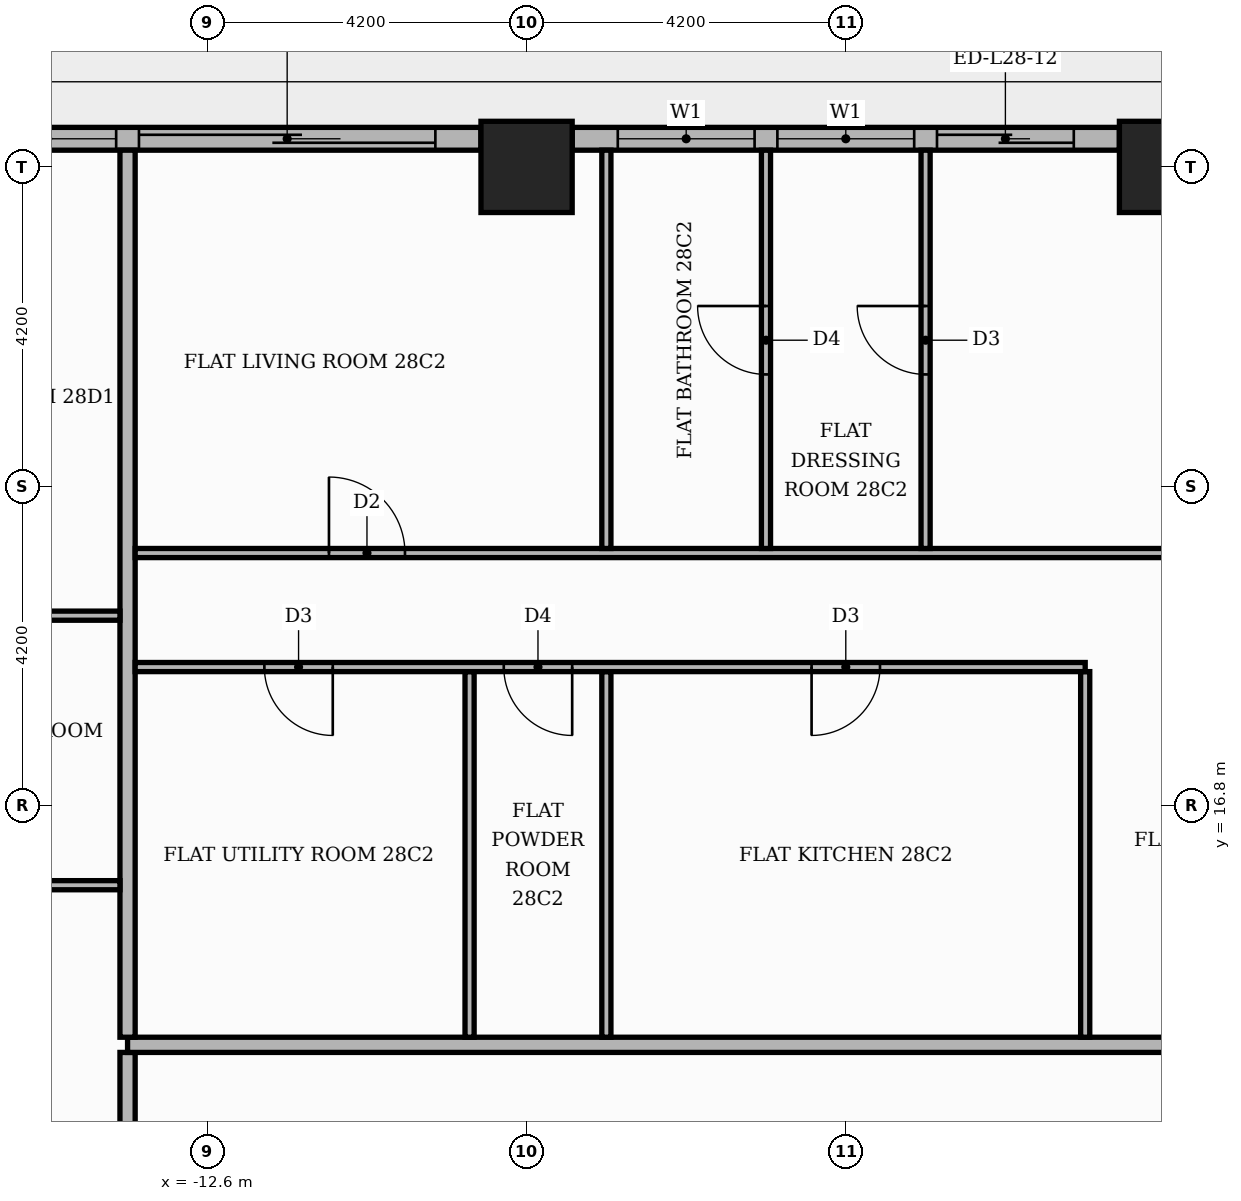
"""IFC4 building model, lengths in metres.
Left out: names, types, materials, properties, quantities, classifications, styles, units other than length and angle.
Written with IfcOpenShell. Run it as: python <this file> out.ifc"""

import sys

from ifc_helpers import new_model, si_unit, direction, frame, frame_2d, origin, origin_2d, place, context, subcontext, project, spatial, rectangle, extrude, element, fill, save


model = new_model("IFC4")
c1 = context("Model", 3, precision=1e-05, world=origin(), true_north=direction((0.0, 1.0)))
c2 = subcontext(c1, "Body", "Model", "MODEL_VIEW")
j1 = project(units=[si_unit("LENGTHUNIT", "METRE"), si_unit("PLANEANGLEUNIT", "RADIAN")], contexts=[c1])
p1 = place(None, origin())
s1 = spatial("IfcSite", under=j1, at=p1, CompositionType="ELEMENT")
p2 = place(p1, origin())
s2 = spatial("IfcBuilding", under=s1, at=p2, CompositionType="ELEMENT")
p3 = place(p2, frame((0.0, 0.0, 118.2)))
s3 = spatial("IfcBuildingStorey", under=s2, at=p3, CompositionType="ELEMENT", Elevation=118.2)
for number, where, z_axis, x_axis in (
    (1, (0.0, 25.2, 0.0), (0.0, 0.0, 1.0), (1.0, 0.0, 0.0)),
    (2, (-8.4, 25.2, 0.0), (0.0, 0.0, 1.0), (1.0, 0.0, 0.0)),
):
    element("IfcColumn", number, at=place(p3, frame(where, z_axis=z_axis, x_axis=x_axis)), inside=s3, PredefinedType="COLUMN", context=c2, shape_type="SweptSolid", body=[
        extrude(rectangle(XDim=1.2, YDim=1.2, at=origin_2d()), origin(), (0.0, 0.0, 1.0), 3.9),
    ])
p4 = place(p3, frame((-0.6, 25.57, 0.0), z_axis=(0.0, 0.0, 1.0), x_axis=(-1.0, 0.0, 0.0)))
e3 = element("IfcWall", 3, at=p4, inside=s3, PredefinedType="STANDARD", context=c2, shape_type="SweptSolid", body=[
    extrude(rectangle(XDim=7.2, YDim=0.3, at=frame_2d((3.6, 0.0))), origin(), (0.0, 0.0, 1.0), 3.48),
])
p5 = place(p4, frame((0.6, 0.0, 0.0)))
e4 = element("IfcOpeningElement", 4, at=p5, cuts=e3, PredefinedType="OPENING", context=c2, shape_type="SweptSolid", body=[
    extrude(rectangle(XDim=1.8, YDim=2.4, at=frame_2d((0.9, 1.2))), frame((0.0, 0.16, 0.0), z_axis=(0.0, -1.0, 0.0), x_axis=(1.0, 0.0, 0.0)), (0.0, 0.0, 1.0), 0.32),
])
p6 = place(p4, frame((2.7, 0.0, 0.9)))
e5 = element("IfcOpeningElement", 5, at=p6, cuts=e3, PredefinedType="OPENING", context=c2, shape_type="SweptSolid", body=[
    extrude(rectangle(XDim=1.8, YDim=2.1, at=frame_2d((0.9, 1.05))), frame((0.0, 0.16, 0.0), z_axis=(0.0, -1.0, 0.0), x_axis=(1.0, 0.0, 0.0)), (0.0, 0.0, 1.0), 0.32),
])
p7 = place(p4, frame((4.8, 0.0, 0.9)))
e6 = element("IfcOpeningElement", 6, at=p7, cuts=e3, PredefinedType="OPENING", context=c2, shape_type="SweptSolid", body=[
    extrude(rectangle(XDim=1.8, YDim=2.1, at=frame_2d((0.9, 1.05))), frame((0.0, 0.16, 0.0), z_axis=(0.0, -1.0, 0.0), x_axis=(1.0, 0.0, 0.0)), (0.0, 0.0, 1.0), 0.32),
])
p8 = place(p3, frame((-9.0, 25.57, 0.0), z_axis=(0.0, 0.0, 1.0), x_axis=(-1.0, 0.0, 0.0)))
e7 = element("IfcWall", 7, at=p8, inside=s3, PredefinedType="STANDARD", context=c2, shape_type="SweptSolid", body=[
    extrude(rectangle(XDim=7.2, YDim=0.3, at=frame_2d((3.6, 0.0))), origin(), (0.0, 0.0, 1.0), 3.48),
])
p9 = place(p8, frame((0.6, 0.0, 0.0)))
e8 = element("IfcOpeningElement", 8, at=p9, cuts=e7, PredefinedType="OPENING", context=c2, shape_type="SweptSolid", body=[
    extrude(rectangle(XDim=3.9, YDim=2.4, at=frame_2d((1.95, 1.2))), frame((0.0, 0.16, 0.0), z_axis=(0.0, -1.0, 0.0), x_axis=(1.0, 0.0, 0.0)), (0.0, 0.0, 1.0), 0.32),
])
p10 = place(p8, frame((4.8, 0.0, 0.9)))
e9 = element("IfcOpeningElement", 9, at=p10, cuts=e7, PredefinedType="OPENING", context=c2, shape_type="SweptSolid", body=[
    extrude(rectangle(XDim=1.8, YDim=2.1, at=frame_2d((0.9, 1.05))), frame((0.0, 0.16, 0.0), z_axis=(0.0, -1.0, 0.0), x_axis=(1.0, 0.0, 0.0)), (0.0, 0.0, 1.0), 0.32),
])
p11 = place(p3, frame((-13.65, 5.35, 0.0), z_axis=(0.0, 0.0, 1.0), x_axis=(0.0, 1.0, 0.0)))
e10 = element("IfcWall", 10, at=p11, inside=s3, PredefinedType="PARTITIONING", context=c2, shape_type="SweptSolid", body=[
    extrude(rectangle(XDim=8.2, YDim=0.2, at=frame_2d((4.1, 0.0))), origin(), (0.0, 0.0, 1.0), 3.48),
])
p12 = place(p11, frame((5.65, 0.0, 0.0)))
e11 = element("IfcOpeningElement", 11, at=p12, cuts=e10, PredefinedType="OPENING", context=c2, shape_type="SweptSolid", body=[
    extrude(rectangle(XDim=1.1, YDim=2.4, at=frame_2d((0.55, 1.2))), frame((0.0, 0.11, 0.0), z_axis=(0.0, -1.0, 0.0), x_axis=(1.0, 0.0, 0.0)), (0.0, 0.0, 1.0), 0.22),
])
p13 = place(p3, frame((-13.65, 13.65, 0.0), z_axis=(0.0, 0.0, 1.0), x_axis=(1.0, 0.0, 0.0)))
e12 = element("IfcWall", 12, at=p13, inside=s3, PredefinedType="PARTITIONING", context=c2, shape_type="SweptSolid", body=[
    extrude(rectangle(XDim=39.07, YDim=0.2, at=frame_2d((19.535, 0.0))), origin(), (0.0, 0.0, 1.0), 3.48),
])
p14 = place(p13, frame((24.65, 0.0, 0.0)))
e13 = element("IfcOpeningElement", 13, at=p14, cuts=e12, PredefinedType="OPENING", context=c2, shape_type="SweptSolid", body=[
    extrude(rectangle(XDim=1.1, YDim=2.4, at=frame_2d((0.55, 1.2))), frame((0.0, 0.11, 0.0), z_axis=(0.0, -1.0, 0.0), x_axis=(1.0, 0.0, 0.0)), (0.0, 0.0, 1.0), 0.22),
])
p15 = place(p13, frame((14.15, 0.0, 0.0)))
e14 = element("IfcOpeningElement", 14, at=p15, cuts=e12, PredefinedType="OPENING", context=c2, shape_type="SweptSolid", body=[
    extrude(rectangle(XDim=1.1, YDim=2.4, at=frame_2d((0.55, 1.2))), frame((0.0, 0.11, 0.0), z_axis=(0.0, -1.0, 0.0), x_axis=(1.0, 0.0, 0.0)), (0.0, 0.0, 1.0), 0.22),
])
p16 = place(p3, frame((-13.65, 13.75, 0.0), z_axis=(0.0, 0.0, 1.0), x_axis=(0.0, 1.0, 0.0)))
e15 = element("IfcWall", 15, at=p16, inside=s3, PredefinedType="PARTITIONING", context=c2, shape_type="SweptSolid", body=[
    extrude(rectangle(XDim=11.67, YDim=0.2, at=frame_2d((5.835, 0.0))), origin(), (0.0, 0.0, 1.0), 3.48),
])
for number, where, z_axis, x_axis in (
    (16, (-9.15, 13.75, 0.0), (0.0, 0.0, 1.0), (0.0, 1.0, 0.0)),
    (17, (-7.35, 13.75, 0.0), (0.0, 0.0, 1.0), (0.0, 1.0, 0.0)),
    (18, (-1.05, 13.75, 0.0), (0.0, 0.0, 1.0), (0.0, 1.0, 0.0)),
):
    element("IfcWall", number, at=place(p3, frame(where, z_axis=z_axis, x_axis=x_axis)), inside=s3, PredefinedType="PARTITIONING", context=c2, shape_type="SweptSolid", body=[
        extrude(rectangle(XDim=4.81, YDim=0.12, at=frame_2d((2.405, 0.0))), origin(), (0.0, 0.0, 1.0), 3.48),
    ])
p17 = place(p3, frame((-19.82, 15.75, 0.0), z_axis=(0.0, 0.0, 1.0), x_axis=(1.0, 0.0, 0.0)))
e19 = element("IfcWall", 19, at=p17, inside=s3, PredefinedType="PARTITIONING", context=c2, shape_type="SweptSolid", body=[
    extrude(rectangle(XDim=6.07, YDim=0.12, at=frame_2d((3.035, 0.0))), origin(), (0.0, 0.0, 1.0), 3.48),
])
p18 = place(p17, frame((2.585, 0.0, 0.0)))
e20 = element("IfcOpeningElement", 20, at=p18, cuts=e19, PredefinedType="OPENING", context=c2, shape_type="SweptSolid", body=[
    extrude(rectangle(XDim=1.0, YDim=2.1, at=frame_2d((0.5, 1.05))), frame((0.0, 0.07, 0.0), z_axis=(0.0, -1.0, 0.0), x_axis=(1.0, 0.0, 0.0)), (0.0, 0.0, 1.0), 0.14),
])
p19 = place(p3, frame((-13.55, 18.62, 0.0), z_axis=(0.0, 0.0, 1.0), x_axis=(1.0, 0.0, 0.0)))
e21 = element("IfcWall", 21, at=p19, inside=s3, PredefinedType="PARTITIONING", context=c2, shape_type="SweptSolid", body=[
    extrude(rectangle(XDim=12.5, YDim=0.12, at=frame_2d((6.25, 0.0))), origin(), (0.0, 0.0, 1.0), 3.48),
])
p20 = place(p19, frame((8.9, 0.0, 0.0)))
e22 = element("IfcOpeningElement", 22, at=p20, cuts=e21, PredefinedType="OPENING", context=c2, shape_type="SweptSolid", body=[
    extrude(rectangle(XDim=0.9, YDim=2.1, at=frame_2d((0.45, 1.05))), frame((0.0, 0.07, 0.0), z_axis=(0.0, -1.0, 0.0), x_axis=(1.0, 0.0, 0.0)), (0.0, 0.0, 1.0), 0.14),
])
p21 = place(p19, frame((4.85, 0.0, 0.0)))
e23 = element("IfcOpeningElement", 23, at=p21, cuts=e21, PredefinedType="OPENING", context=c2, shape_type="SweptSolid", body=[
    extrude(rectangle(XDim=0.9, YDim=2.1, at=frame_2d((0.45, 1.05))), frame((0.0, 0.07, 0.0), z_axis=(0.0, -1.0, 0.0), x_axis=(1.0, 0.0, 0.0)), (0.0, 0.0, 1.0), 0.14),
])
p22 = place(p19, frame((1.7, 0.0, 0.0)))
e24 = element("IfcOpeningElement", 24, at=p22, cuts=e21, PredefinedType="OPENING", context=c2, shape_type="SweptSolid", body=[
    extrude(rectangle(XDim=0.9, YDim=2.1, at=frame_2d((0.45, 1.05))), frame((0.0, 0.07, 0.0), z_axis=(0.0, -1.0, 0.0), x_axis=(1.0, 0.0, 0.0)), (0.0, 0.0, 1.0), 0.14),
])
p23 = place(p3, frame((-17.4, 19.296, 0.0), z_axis=(0.0, 0.0, 1.0), x_axis=(1.0, 0.0, 0.0)))
e25 = element("IfcWall", 25, at=p23, inside=s3, PredefinedType="PARTITIONING", context=c2, shape_type="SweptSolid", body=[
    extrude(rectangle(XDim=3.65, YDim=0.12, at=frame_2d((1.825, 0.0))), origin(), (0.0, 0.0, 1.0), 3.48),
])
p24 = place(p3, frame((-13.55, 20.12, 0.0), z_axis=(0.0, 0.0, 1.0), x_axis=(1.0, 0.0, 0.0)))
e26 = element("IfcWall", 26, at=p24, inside=s3, PredefinedType="PARTITIONING", context=c2, shape_type="SweptSolid", body=[
    extrude(rectangle(XDim=18.7, YDim=0.12, at=frame_2d((9.35, 0.0))), origin(), (0.0, 0.0, 1.0), 3.48),
])
p25 = place(p24, frame((14.15, 0.0, 0.0)))
e27 = element("IfcOpeningElement", 27, at=p25, cuts=e26, PredefinedType="OPENING", context=c2, shape_type="SweptSolid", body=[
    extrude(rectangle(XDim=0.9, YDim=2.1, at=frame_2d((0.45, 1.05))), frame((0.0, 0.07, 0.0), z_axis=(0.0, -1.0, 0.0), x_axis=(1.0, 0.0, 0.0)), (0.0, 0.0, 1.0), 0.14),
])
p26 = place(p24, frame((2.55, 0.0, 0.0)))
e28 = element("IfcOpeningElement", 28, at=p26, cuts=e26, PredefinedType="OPENING", context=c2, shape_type="SweptSolid", body=[
    extrude(rectangle(XDim=1.0, YDim=2.1, at=frame_2d((0.5, 1.05))), frame((0.0, 0.07, 0.0), z_axis=(0.0, -1.0, 0.0), x_axis=(1.0, 0.0, 0.0)), (0.0, 0.0, 1.0), 0.14),
])
p27 = place(p3, frame((-7.35, 20.18, 0.0), z_axis=(0.0, 0.0, 1.0), x_axis=(0.0, 1.0, 0.0)))
e29 = element("IfcWall", 29, at=p27, inside=s3, PredefinedType="PARTITIONING", context=c2, shape_type="SweptSolid", body=[
    extrude(rectangle(XDim=5.24, YDim=0.12, at=frame_2d((2.62, 0.0))), origin(), (0.0, 0.0, 1.0), 3.48),
])
p28 = place(p3, frame((-5.25, 20.18, 0.0), z_axis=(0.0, 0.0, 1.0), x_axis=(0.0, 1.0, 0.0)))
e30 = element("IfcWall", 30, at=p28, inside=s3, PredefinedType="PARTITIONING", context=c2, shape_type="SweptSolid", body=[
    extrude(rectangle(XDim=5.24, YDim=0.12, at=frame_2d((2.62, 0.0))), origin(), (0.0, 0.0, 1.0), 3.48),
])
p29 = place(p28, frame((2.29, 0.0, 0.0)))
e31 = element("IfcOpeningElement", 31, at=p29, cuts=e30, PredefinedType="OPENING", context=c2, shape_type="SweptSolid", body=[
    extrude(rectangle(XDim=0.9, YDim=2.1, at=frame_2d((0.45, 1.05))), frame((0.0, 0.07, 0.0), z_axis=(0.0, -1.0, 0.0), x_axis=(1.0, 0.0, 0.0)), (0.0, 0.0, 1.0), 0.14),
])
p30 = place(p3, frame((-3.15, 20.18, 0.0), z_axis=(0.0, 0.0, 1.0), x_axis=(0.0, 1.0, 0.0)))
e32 = element("IfcWall", 32, at=p30, inside=s3, PredefinedType="PARTITIONING", context=c2, shape_type="SweptSolid", body=[
    extrude(rectangle(XDim=5.24, YDim=0.12, at=frame_2d((2.62, 0.0))), origin(), (0.0, 0.0, 1.0), 3.48),
])
p31 = place(p30, frame((2.29, 0.0, 0.0)))
e33 = element("IfcOpeningElement", 33, at=p31, cuts=e32, PredefinedType="OPENING", context=c2, shape_type="SweptSolid", body=[
    extrude(rectangle(XDim=0.9, YDim=2.1, at=frame_2d((0.45, 1.05))), frame((0.0, 0.07, 0.0), z_axis=(0.0, -1.0, 0.0), x_axis=(1.0, 0.0, 0.0)), (0.0, 0.0, 1.0), 0.14),
])
p32 = place(p5, origin())
e34 = element("IfcDoor", 34, at=p32, inside=s3, OperationType="SLIDING_TO_LEFT", PredefinedType="DOOR", context=c2, shape_type="SweptSolid", body=[
    extrude(rectangle(XDim=1.8, YDim=2.4, at=frame_2d((0.9, 1.2))), frame((0.0, 0.025, 0.0), z_axis=(0.0, -1.0, 0.0), x_axis=(1.0, 0.0, 0.0)), (0.0, 0.0, 1.0), 0.05),
])
fill(e4, e34)
p33 = place(p6, origin())
e35 = element("IfcWindow", 35, at=p33, inside=s3, PartitioningType="SINGLE_PANEL", PredefinedType="WINDOW", context=c2, shape_type="SweptSolid", body=[
    extrude(rectangle(XDim=1.8, YDim=2.1, at=frame_2d((0.9, 1.05))), frame((0.0, 0.03, 0.0), z_axis=(0.0, -1.0, 0.0), x_axis=(1.0, 0.0, 0.0)), (0.0, 0.0, 1.0), 0.06),
])
fill(e5, e35)
p34 = place(p7, origin())
e36 = element("IfcWindow", 36, at=p34, inside=s3, PartitioningType="SINGLE_PANEL", PredefinedType="WINDOW", context=c2, shape_type="SweptSolid", body=[
    extrude(rectangle(XDim=1.8, YDim=2.1, at=frame_2d((0.9, 1.05))), frame((0.0, 0.03, 0.0), z_axis=(0.0, -1.0, 0.0), x_axis=(1.0, 0.0, 0.0)), (0.0, 0.0, 1.0), 0.06),
])
fill(e6, e36)
p35 = place(p9, origin())
e37 = element("IfcDoor", 37, at=p35, inside=s3, OperationType="SLIDING_TO_LEFT", PredefinedType="DOOR", context=c2, shape_type="SweptSolid", body=[
    extrude(rectangle(XDim=3.9, YDim=2.4, at=frame_2d((1.95, 1.2))), frame((0.0, 0.025, 0.0), z_axis=(0.0, -1.0, 0.0), x_axis=(1.0, 0.0, 0.0)), (0.0, 0.0, 1.0), 0.05),
])
fill(e8, e37)
p36 = place(p10, origin())
e38 = element("IfcWindow", 38, at=p36, inside=s3, PartitioningType="SINGLE_PANEL", PredefinedType="WINDOW", context=c2, shape_type="SweptSolid", body=[
    extrude(rectangle(XDim=1.8, YDim=2.1, at=frame_2d((0.9, 1.05))), frame((0.0, 0.03, 0.0), z_axis=(0.0, -1.0, 0.0), x_axis=(1.0, 0.0, 0.0)), (0.0, 0.0, 1.0), 0.06),
])
fill(e9, e38)
p37 = place(p20, frame((0.9, 0.0, 0.0), z_axis=(0.0, 0.0, 1.0), x_axis=(-1.0, 0.0, 0.0)))
e39 = element("IfcDoor", 39, at=p37, inside=s3, OperationType="SINGLE_SWING_LEFT", PredefinedType="DOOR", context=c2, shape_type="SweptSolid", body=[
    extrude(rectangle(XDim=0.9, YDim=2.1, at=frame_2d((0.45, 1.05))), frame((0.0, 0.025, 0.0), z_axis=(0.0, -1.0, 0.0), x_axis=(1.0, 0.0, 0.0)), (0.0, 0.0, 1.0), 0.05),
])
fill(e22, e39)
p38 = place(p21, frame((0.9, 0.0, 0.0), z_axis=(0.0, 0.0, 1.0), x_axis=(-1.0, 0.0, 0.0)))
e40 = element("IfcDoor", 40, at=p38, inside=s3, OperationType="SINGLE_SWING_RIGHT", PredefinedType="DOOR", context=c2, shape_type="SweptSolid", body=[
    extrude(rectangle(XDim=0.9, YDim=2.1, at=frame_2d((0.45, 1.05))), frame((0.0, 0.025, 0.0), z_axis=(0.0, -1.0, 0.0), x_axis=(1.0, 0.0, 0.0)), (0.0, 0.0, 1.0), 0.05),
])
fill(e23, e40)
p39 = place(p22, frame((0.9, 0.0, 0.0), z_axis=(0.0, 0.0, 1.0), x_axis=(-1.0, 0.0, 0.0)))
e41 = element("IfcDoor", 41, at=p39, inside=s3, OperationType="SINGLE_SWING_RIGHT", PredefinedType="DOOR", context=c2, shape_type="SweptSolid", body=[
    extrude(rectangle(XDim=0.9, YDim=2.1, at=frame_2d((0.45, 1.05))), frame((0.0, 0.025, 0.0), z_axis=(0.0, -1.0, 0.0), x_axis=(1.0, 0.0, 0.0)), (0.0, 0.0, 1.0), 0.05),
])
fill(e24, e41)
p40 = place(p31, origin())
e42 = element("IfcDoor", 42, at=p40, inside=s3, OperationType="SINGLE_SWING_RIGHT", PredefinedType="DOOR", context=c2, shape_type="SweptSolid", body=[
    extrude(rectangle(XDim=0.9, YDim=2.1, at=frame_2d((0.45, 1.05))), frame((0.0, 0.025, 0.0), z_axis=(0.0, -1.0, 0.0), x_axis=(1.0, 0.0, 0.0)), (0.0, 0.0, 1.0), 0.05),
])
fill(e33, e42)
p41 = place(p29, origin())
e43 = element("IfcDoor", 43, at=p41, inside=s3, OperationType="SINGLE_SWING_RIGHT", PredefinedType="DOOR", context=c2, shape_type="SweptSolid", body=[
    extrude(rectangle(XDim=0.9, YDim=2.1, at=frame_2d((0.45, 1.05))), frame((0.0, 0.025, 0.0), z_axis=(0.0, -1.0, 0.0), x_axis=(1.0, 0.0, 0.0)), (0.0, 0.0, 1.0), 0.05),
])
fill(e31, e43)
p42 = place(p26, origin())
e44 = element("IfcDoor", 44, at=p42, inside=s3, OperationType="SINGLE_SWING_LEFT", PredefinedType="DOOR", context=c2, shape_type="SweptSolid", body=[
    extrude(rectangle(XDim=1.0, YDim=2.1, at=frame_2d((0.5, 1.05))), frame((0.0, 0.025, 0.0), z_axis=(0.0, -1.0, 0.0), x_axis=(1.0, 0.0, 0.0)), (0.0, 0.0, 1.0), 0.05),
])
fill(e28, e44)
save(model, sys.argv[1])
